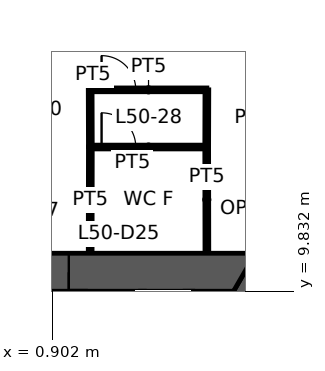
"""IFC4 building model, lengths in metres.
Left out: names, types, materials, properties, quantities, classifications, styles, units other than length and angle.
Written with IfcOpenShell. Run it as: python <this file> out.ifc"""

import sys

from ifc_helpers import new_model, si_unit, direction, frame, frame_2d, origin, place, context, subcontext, project, spatial, polyline, rectangle, outline, extrude, element, fill, save


model = new_model("IFC4")
c1 = context("Model", 3, precision=1e-05, world=origin(), true_north=direction((0.0, 1.0)))
c2 = subcontext(c1, "Body", "Model", "MODEL_VIEW")
j1 = project(units=[si_unit("LENGTHUNIT", "METRE"), si_unit("PLANEANGLEUNIT", "RADIAN")], contexts=[c1])
p1 = place(None, origin())
s1 = spatial("IfcSite", under=j1, at=p1, CompositionType="ELEMENT")
p2 = place(p1, origin())
s2 = spatial("IfcBuilding", under=s1, at=p2, CompositionType="ELEMENT")
p3 = place(p2, frame((0.0, 0.0, 199.4)))
s3 = spatial("IfcBuildingStorey", under=s2, at=p3, CompositionType="ELEMENT", Elevation=199.4)
p4 = place(p3, frame((11.922, 0.0, 0.0), z_axis=(0.0, 0.0, 1.0), x_axis=(-0.500004296715, 0.866022923061, 0.0)))
e1 = element("IfcWall", 1, at=p4, inside=s3, PredefinedType="SHEAR", context=c2, shape_type="SweptSolid", body=[
    extrude(outline(polyline([(-0.289, -0.5), (5.835, -0.5), (6.635, -0.5), (12.211, -0.5), (11.634, 0.5), (6.635, 0.5), (5.835, 0.5), (0.289, 0.5), (-0.289, -0.5)])), origin(), (0.0, 0.0, 1.0), 3.9),
])
p5 = place(p4, frame((5.835, 0.0, 0.0)))
e2 = element("IfcOpeningElement", 2, at=p5, cuts=e1, PredefinedType="OPENING", context=c2, shape_type="SweptSolid", body=[
    extrude(rectangle(XDim=0.8, YDim=2.1, at=frame_2d((0.4, 1.05))), frame((0.0, 0.51, 0.0), z_axis=(0.0, -1.0, 0.0), x_axis=(1.0, 0.0, 0.0)), (0.0, 0.0, 1.0), 1.02),
])
p6 = place(p3, frame((5.961, 10.325, 0.0), z_axis=(0.0, 0.0, 1.0), x_axis=(-1.0, 0.0, 0.0)))
e3 = element("IfcWall", 3, at=p6, inside=s3, PredefinedType="SHEAR", context=c2, shape_type="SweptSolid", body=[
    extrude(outline(polyline([(-0.289, -0.5), (4.624, -0.5), (5.523, -0.5), (6.399, -0.5), (7.299, -0.5), (12.211, -0.5), (11.634, 0.5), (7.299, 0.5), (6.399, 0.5), (5.523, 0.5), (4.624, 0.5), (0.289, 0.5), (-0.289, -0.5)])), origin(), (0.0, 0.0, 1.0), 3.9),
])
p7 = place(p6, frame((6.399, 0.0, 0.0)))
e4 = element("IfcOpeningElement", 4, at=p7, cuts=e3, PredefinedType="OPENING", context=c2, shape_type="SweptSolid", body=[
    extrude(rectangle(XDim=0.9, YDim=2.1, at=frame_2d((0.45, 1.05))), frame((0.0, 0.51, 0.0), z_axis=(0.0, -1.0, 0.0), x_axis=(1.0, 0.0, 0.0)), (0.0, 0.0, 1.0), 1.02),
])
p8 = place(p6, frame((4.624, 0.0, 0.0)))
e5 = element("IfcOpeningElement", 5, at=p8, cuts=e3, PredefinedType="OPENING", context=c2, shape_type="SweptSolid", body=[
    extrude(rectangle(XDim=0.9, YDim=2.1, at=frame_2d((0.45, 1.05))), frame((0.0, 0.51, 0.0), z_axis=(0.0, -1.0, 0.0), x_axis=(1.0, 0.0, 0.0)), (0.0, 0.0, 1.0), 1.02),
])
p9 = place(p3, frame((1.9, 13.62, 0.0), z_axis=(0.0, 0.0, 1.0), x_axis=(1.0, 0.0, 0.0)))
e6 = element("IfcWall", 6, at=p9, inside=s3, PredefinedType="PARTITIONING", context=c2, shape_type="SweptSolid", body=[
    extrude(rectangle(XDim=3.071, YDim=0.1, at=frame_2d((1.536, 0.0))), origin(), (0.0, 0.0, 1.0), 2.35),
])
p10 = place(p9, frame((0.3, 0.0, 0.0)))
e7 = element("IfcOpeningElement", 7, at=p10, cuts=e6, PredefinedType="OPENING", context=c2, shape_type="SweptSolid", body=[
    extrude(rectangle(XDim=0.9, YDim=2.1, at=frame_2d((0.45, 1.05))), frame((0.0, 0.06, 0.0), z_axis=(0.0, -1.0, 0.0), x_axis=(1.0, 0.0, 0.0)), (0.0, 0.0, 1.0), 0.12),
])
for number, where, z_axis, x_axis in (
    (8, (1.9, 10.845, 0.0), (0.0, 0.0, 1.0), (0.002, 1.0, 0.0)),
    (9, (4.966, 13.625, 0.0), (0.0, 0.0, 1.0), (0.002, -1.0, 0.0)),
):
    element("IfcWall", number, at=place(p3, frame(where, z_axis=z_axis, x_axis=x_axis)), inside=s3, PredefinedType="PARTITIONING", context=c2, shape_type="SweptSolid", body=[
        extrude(rectangle(XDim=2.78, YDim=0.1, at=frame_2d((1.39, 0.0))), origin(), (0.0, 0.0, 1.0), 2.35),
    ])
p11 = place(p3, frame((1.9, 15.125, 0.0), z_axis=(0.0, 0.0, 1.0), x_axis=(1.0, 0.0, 0.0)))
e10 = element("IfcWall", 10, at=p11, inside=s3, PredefinedType="PARTITIONING", context=c2, shape_type="SweptSolid", body=[
    extrude(rectangle(XDim=3.071, YDim=0.1, at=frame_2d((1.536, 0.0))), origin(), (0.0, 0.0, 1.0), 2.35),
])
p12 = place(p11, frame((0.3, 0.0, 0.0)))
e11 = element("IfcOpeningElement", 11, at=p12, cuts=e10, PredefinedType="OPENING", context=c2, shape_type="SweptSolid", body=[
    extrude(rectangle(XDim=0.9, YDim=2.1, at=frame_2d((0.45, 1.05))), frame((0.0, 0.06, 0.0), z_axis=(0.0, -1.0, 0.0), x_axis=(1.0, 0.0, 0.0)), (0.0, 0.0, 1.0), 0.12),
])
for number, where, z_axis, x_axis in (
    (12, (1.905, 13.625, 0.0), (0.0, 0.0, 1.0), (-0.003, 1.0, 0.0)),
    (13, (4.971, 15.125, 0.0), (0.0, 0.0, 1.0), (-0.003, -1.0, 0.0)),
):
    element("IfcWall", number, at=place(p3, frame(where, z_axis=z_axis, x_axis=x_axis)), inside=s3, PredefinedType="PARTITIONING", context=c2, shape_type="SweptSolid", body=[
        extrude(rectangle(XDim=1.5, YDim=0.1, at=frame_2d((0.75, 0.0))), origin(), (0.0, 0.0, 1.0), 2.35),
    ])
p13 = place(p8, origin())
e14 = element("IfcDoor", 14, at=p13, inside=s3, OperationType="SINGLE_SWING_LEFT", PredefinedType="DOOR", context=c2, shape_type="SweptSolid", body=[
    extrude(rectangle(XDim=0.9, YDim=2.1, at=frame_2d((0.45, 1.05))), frame((0.0, 0.025, 0.0), z_axis=(0.0, -1.0, 0.0), x_axis=(1.0, 0.0, 0.0)), (0.0, 0.0, 1.0), 0.05),
])
fill(e5, e14)
p14 = place(p10, origin())
e15 = element("IfcDoor", 15, at=p14, inside=s3, OperationType="SINGLE_SWING_LEFT", PredefinedType="DOOR", context=c2, shape_type="SweptSolid", body=[
    extrude(rectangle(XDim=0.9, YDim=2.1, at=frame_2d((0.45, 1.05))), frame((0.0, 0.025, 0.0), z_axis=(0.0, -1.0, 0.0), x_axis=(1.0, 0.0, 0.0)), (0.0, 0.0, 1.0), 0.05),
])
fill(e7, e15)
p15 = place(p12, origin())
e16 = element("IfcDoor", 16, at=p15, inside=s3, OperationType="SINGLE_SWING_LEFT", PredefinedType="DOOR", context=c2, shape_type="SweptSolid", body=[
    extrude(rectangle(XDim=0.9, YDim=2.1, at=frame_2d((0.45, 1.05))), frame((0.0, 0.025, 0.0), z_axis=(0.0, -1.0, 0.0), x_axis=(1.0, 0.0, 0.0)), (0.0, 0.0, 1.0), 0.05),
])
fill(e11, e16)
save(model, sys.argv[1])
